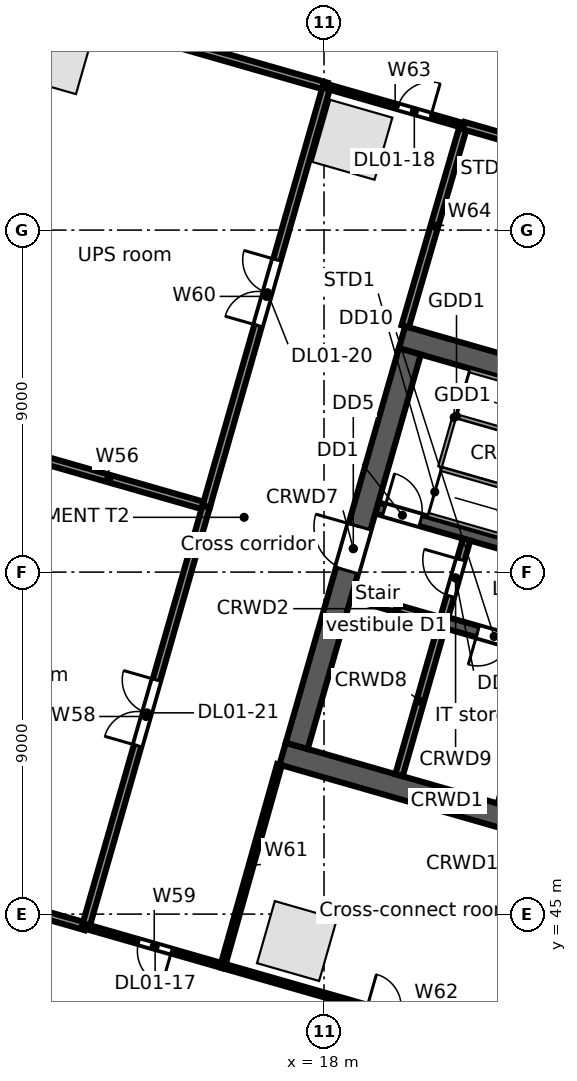
"""IFC4 building model, lengths in metres.
Left out: names, types, materials, properties, quantities, classifications, styles, units other than length and angle.
Written with IfcOpenShell. Run it as: python <this file> out.ifc"""

import sys

from ifc_helpers import new_model, si_unit, direction, frame, frame_2d, origin, origin_2d, place, context, subcontext, project, spatial, rectangle, extrude, element, fill, save


model = new_model("IFC4")
c1 = context("Model", 3, precision=1e-05, world=origin(), true_north=direction((0.0, 1.0)))
c2 = subcontext(c1, "Body", "Model", "MODEL_VIEW")
j1 = project(units=[si_unit("LENGTHUNIT", "METRE"), si_unit("PLANEANGLEUNIT", "RADIAN")], contexts=[c1])
p1 = place(None, origin())
s1 = spatial("IfcSite", under=j1, at=p1, CompositionType="ELEMENT")
p2 = place(p1, origin())
s2 = spatial("IfcBuilding", under=s1, at=p2, CompositionType="ELEMENT")
p3 = place(p2, frame((0.0, 0.0, 6.5)))
s3 = spatial("IfcBuildingStorey", under=s2, at=p3, CompositionType="ELEMENT", Elevation=6.5)
for number, where, z_axis, x_axis in (
    (1, (18.746, 65.376, 0.0), (0.0, 0.0, 1.0), (-0.961, 0.276, 0.0)),
    (2, (10.89, 67.629, 0.0), (0.0, 0.0, 1.0), (-0.961, 0.276, 0.0)),
    (3, (17.288, 44.291, 0.0), (0.0, 0.0, 1.0), (0.961, -0.276, 0.0)),
):
    element("IfcColumn", number, at=place(p3, frame(where, z_axis=z_axis, x_axis=x_axis)), inside=s3, PredefinedType="COLUMN", context=c2, shape_type="SweptSolid", body=[
        extrude(rectangle(XDim=1.7, YDim=1.7, at=origin_2d()), origin(), (0.0, 0.0, 1.0), 5.0),
    ])
p4 = place(p3, frame((16.911, 49.221, 0.0), z_axis=(0.0, 0.0, 1.0), x_axis=(0.96126248289, -0.275634611374, 0.0)))
e4 = element("IfcWall", 4, at=p4, inside=s3, PredefinedType="SOLIDWALL", context=c2, shape_type="SweptSolid", body=[
    extrude(rectangle(XDim=9.0, YDim=0.6, at=frame_2d((4.5, 0.0))), origin(), (0.0, 0.0, 1.0), 4.65),
])
p5 = place(p3, frame((18.728, 53.382, 0.0), z_axis=(0.0, 0.0, 1.0), x_axis=(0.961247070632, -0.275688355216, 0.0)))
e5 = element("IfcWall", 5, at=p5, inside=s3, PredefinedType="SOLIDWALL", context=c2, shape_type="SweptSolid", body=[
    extrude(rectangle(XDim=2.5, YDim=0.2, at=frame_2d((1.25, 0.0))), origin(), (0.0, 0.0, 1.0), 4.65),
])
p6 = place(p3, frame((21.131, 52.692, 0.0), z_axis=(0.0, 0.0, 1.0), x_axis=(0.961271492568, -0.275603188616, 0.0)))
e6 = element("IfcWall", 6, at=p6, inside=s3, PredefinedType="SOLIDWALL", context=c2, shape_type="SweptSolid", body=[
    extrude(rectangle(XDim=5.3, YDim=0.3, at=frame_2d((2.65, 0.0))), origin(), (0.0, 0.0, 1.0), 4.65),
])
p7 = place(p6, frame((0.95, 0.0, 0.0)))
e7 = element("IfcOpeningElement", 7, at=p7, cuts=e6, PredefinedType="OPENING", context=c2, shape_type="SweptSolid", body=[
    extrude(rectangle(XDim=0.9, YDim=2.1, at=frame_2d((0.45, 1.05))), frame((0.0, 0.16, 0.0), z_axis=(0.0, -1.0, 0.0), x_axis=(1.0, 0.0, 0.0)), (0.0, 0.0, 1.0), 0.32),
])
p8 = place(p6, frame((3.75, 0.0, 0.0)))
e8 = element("IfcOpeningElement", 8, at=p8, cuts=e6, PredefinedType="OPENING", context=c2, shape_type="SweptSolid", body=[
    extrude(rectangle(XDim=0.9, YDim=2.1, at=frame_2d((0.45, 1.05))), frame((0.0, 0.16, 0.0), z_axis=(0.0, -1.0, 0.0), x_axis=(1.0, 0.0, 0.0)), (0.0, 0.0, 1.0), 0.32),
])
p9 = place(p3, frame((19.389, 55.689, 0.0), z_axis=(0.0, 0.0, 1.0), x_axis=(0.961261397636, -0.275638396117, 0.0)))
e9 = element("IfcWall", 9, at=p9, inside=s3, PredefinedType="SOLIDWALL", context=c2, shape_type="SweptSolid", body=[
    extrude(rectangle(XDim=7.1, YDim=0.3, at=frame_2d((3.55, 0.0))), origin(), (0.0, 0.0, 1.0), 4.65),
])
p10 = place(p9, frame((0.2, 0.0, 0.0)))
e10 = element("IfcOpeningElement", 10, at=p10, cuts=e9, PredefinedType="OPENING", context=c2, shape_type="SweptSolid", body=[
    extrude(rectangle(XDim=1.0, YDim=2.1, at=frame_2d((0.5, 1.05))), frame((0.0, 0.16, 0.0), z_axis=(0.0, -1.0, 0.0), x_axis=(1.0, 0.0, 0.0)), (0.0, 0.0, 1.0), 0.32),
])
p11 = place(p3, frame((20.053, 60.18, 0.0), z_axis=(0.0, 0.0, 1.0), x_axis=(0.96126248289, -0.275634611374, 0.0)))
e11 = element("IfcWall", 11, at=p11, inside=s3, PredefinedType="SOLIDWALL", context=c2, shape_type="SweptSolid", body=[
    extrude(rectangle(XDim=9.0, YDim=0.6, at=frame_2d((4.5, 0.0))), origin(), (0.0, 0.0, 1.0), 4.65),
])
p12 = place(p3, frame((17.282, 49.427, 0.0), z_axis=(0.0, 0.0, 1.0), x_axis=(0.275631631629, 0.961263337304, 0.0)))
e12 = element("IfcWall", 12, at=p12, inside=s3, PredefinedType="SOLIDWALL", context=c2, shape_type="SweptSolid", body=[
    extrude(rectangle(XDim=10.8, YDim=0.6, at=frame_2d((5.4, 0.0))), origin(), (0.0, 0.0, 1.0), 4.65),
])
p13 = place(p12, frame((4.8, 0.0, 0.0)))
e13 = element("IfcOpeningElement", 13, at=p13, cuts=e12, PredefinedType="OPENING", context=c2, shape_type="SweptSolid", body=[
    extrude(rectangle(XDim=1.2, YDim=2.1, at=frame_2d((0.6, 1.05))), frame((0.0, 0.31, 0.0), z_axis=(0.0, -1.0, 0.0), x_axis=(1.0, 0.0, 0.0)), (0.0, 0.0, 1.0), 0.62),
])
p14 = place(p3, frame((19.973, 48.655, 0.0), z_axis=(0.0, 0.0, 1.0), x_axis=(0.275668441653, 0.961252781674, 0.0)))
e14 = element("IfcWall", 14, at=p14, inside=s3, PredefinedType="SOLIDWALL", context=c2, shape_type="SweptSolid", body=[
    extrude(rectangle(XDim=4.05, YDim=0.2, at=frame_2d((2.025, 0.0))), origin(), (0.0, 0.0, 1.0), 4.65),
])
p15 = place(p3, frame((21.172, 52.837, 0.0), z_axis=(0.0, 0.0, 1.0), x_axis=(0.275657676022, 0.961255868981, 0.0)))
e15 = element("IfcWall", 15, at=p15, inside=s3, PredefinedType="PARTITIONING", context=c2, shape_type="SweptSolid", body=[
    extrude(rectangle(XDim=2.1, YDim=0.2, at=frame_2d((1.05, 0.0))), origin(), (0.0, 0.0, 1.0), 4.65),
])
p16 = place(p15, frame((0.55, 0.0, 0.0)))
e16 = element("IfcOpeningElement", 16, at=p16, cuts=e15, PredefinedType="OPENING", context=c2, shape_type="SweptSolid", body=[
    extrude(rectangle(XDim=1.0, YDim=2.1, at=frame_2d((0.5, 1.05))), frame((0.0, 0.11, 0.0), z_axis=(0.0, -1.0, 0.0), x_axis=(1.0, 0.0, 0.0)), (0.0, 0.0, 1.0), 0.22),
])
p17 = place(p3, frame((4.28, 46.809, 0.0), z_axis=(0.0, 0.0, 1.0), x_axis=(0.961270337968, -0.275607215693, 0.0)))
e17 = element("IfcWall", 17, at=p17, inside=s3, PredefinedType="PARTITIONING", context=c2, shape_type="SweptSolid", body=[
    extrude(rectangle(XDim=7.75, YDim=0.2, at=frame_2d((3.875, 0.0))), origin(), (0.0, 0.0, 1.0), 4.03),
])
p18 = place(p3, frame((9.77, 57.199, 0.0), z_axis=(0.0, 0.0, 1.0), x_axis=(0.961262835898, -0.275633380273, 0.0)))
e18 = element("IfcWall", 18, at=p18, inside=s3, PredefinedType="PARTITIONING", context=c2, shape_type="SweptSolid", body=[
    extrude(rectangle(XDim=5.337, YDim=0.2, at=frame_2d((2.668, 0.0))), origin(), (0.0, 0.0, 1.0), 3.712),
])
p19 = place(p3, frame((10.62, 68.918, 0.0), z_axis=(0.0, 0.0, 1.0), x_axis=(0.961260764876, -0.275640602796, 0.0)))
e19 = element("IfcWall", 19, at=p19, inside=s3, PredefinedType="PARTITIONING", context=c2, shape_type="SweptSolid", body=[
    extrude(rectangle(XDim=7.749, YDim=0.2, at=frame_2d((3.875, 0.0))), origin(), (0.0, 0.0, 1.0), 3.712),
])
p20 = place(p3, frame((11.73, 44.673, 0.0), z_axis=(0.0, 0.0, 1.0), x_axis=(0.275635044812, 0.961262358605, 0.0)))
e20 = element("IfcWall", 20, at=p20, inside=s3, PredefinedType="PARTITIONING", context=c2, shape_type="SweptSolid", body=[
    extrude(rectangle(XDim=11.5, YDim=0.2, at=frame_2d((5.75, 0.0))), origin(), (0.0, 0.0, 1.0), 3.712),
])
p21 = place(p20, frame((4.95, 0.0, 0.0)))
e21 = element("IfcOpeningElement", 21, at=p21, cuts=e20, PredefinedType="OPENING", context=c2, shape_type="SweptSolid", body=[
    extrude(rectangle(XDim=1.8, YDim=2.1, at=frame_2d((0.9, 1.05))), frame((0.0, 0.11, 0.0), z_axis=(0.0, -1.0, 0.0), x_axis=(1.0, 0.0, 0.0)), (0.0, 0.0, 1.0), 0.22),
])
p22 = place(p3, frame((11.73, 44.673, 0.0), z_axis=(0.0, 0.0, 1.0), x_axis=(0.961228613303, -0.275752702557, 0.0)))
e22 = element("IfcWall", 22, at=p22, inside=s3, PredefinedType="PARTITIONING", context=c2, shape_type="SweptSolid", body=[
    extrude(rectangle(XDim=3.75, YDim=0.125, at=frame_2d((1.875, 0.0))), origin(), (0.0, 0.0, 1.0), 4.65),
])
p23 = place(p22, frame((1.45, 0.0, 0.0)))
e23 = element("IfcOpeningElement", 23, at=p23, cuts=e22, PredefinedType="OPENING", context=c2, shape_type="SweptSolid", body=[
    extrude(rectangle(XDim=0.9, YDim=2.1, at=frame_2d((0.45, 1.05))), frame((0.0, 0.073, 0.0), z_axis=(0.0, -1.0, 0.0), x_axis=(1.0, 0.0, 0.0)), (0.0, 0.0, 1.0), 0.145),
])
p24 = place(p3, frame((14.9, 55.728, 0.0), z_axis=(0.0, 0.0, 1.0), x_axis=(0.27559869205, 0.961272781754, 0.0)))
e24 = element("IfcWall", 24, at=p24, inside=s3, PredefinedType="PARTITIONING", context=c2, shape_type="SweptSolid", body=[
    extrude(rectangle(XDim=11.499, YDim=0.2, at=frame_2d((5.75, 0.0))), origin(), (0.0, 0.0, 1.0), 3.712),
])
p25 = place(p24, frame((4.95, 0.0, 0.0)))
e25 = element("IfcOpeningElement", 25, at=p25, cuts=e24, PredefinedType="OPENING", context=c2, shape_type="SweptSolid", body=[
    extrude(rectangle(XDim=1.8, YDim=2.1, at=frame_2d((0.9, 1.05))), frame((0.0, 0.11, 0.0), z_axis=(0.0, -1.0, 0.0), x_axis=(1.0, 0.0, 0.0)), (0.0, 0.0, 1.0), 0.22),
])
p26 = place(p3, frame((15.335, 43.639, 0.0), z_axis=(0.0, 0.0, 1.0), x_axis=(0.271407455373, 0.962464541252, 0.0)))
e26 = element("IfcWall", 26, at=p26, inside=s3, PredefinedType="PARTITIONING", context=c2, shape_type="SweptSolid", body=[
    extrude(rectangle(XDim=5.501, YDim=0.125, at=frame_2d((2.75, 0.0))), origin(), (0.0, 0.0, 1.0), 3.93),
])
p27 = place(p3, frame((15.335, 43.639, 0.0), z_axis=(0.0, 0.0, 1.0), x_axis=(0.961281982754, -0.275566597455, 0.0)))
e27 = element("IfcWall", 27, at=p27, inside=s3, PredefinedType="PARTITIONING", context=c2, shape_type="SweptSolid", body=[
    extrude(rectangle(XDim=9.0, YDim=0.125, at=frame_2d((4.5, 0.0))), origin(), (0.0, 0.0, 1.0), 3.822),
])
p28 = place(p27, frame((3.95, 0.0, 0.0)))
e28 = element("IfcOpeningElement", 28, at=p28, cuts=e27, PredefinedType="OPENING", context=c2, shape_type="SweptSolid", body=[
    extrude(rectangle(XDim=0.9, YDim=2.1, at=frame_2d((0.45, 1.05))), frame((0.0, 0.073, 0.0), z_axis=(0.0, -1.0, 0.0), x_axis=(1.0, 0.0, 0.0)), (0.0, 0.0, 1.0), 0.145),
])
p29 = place(p3, frame((18.069, 66.782, 0.0), z_axis=(0.0, 0.0, 1.0), x_axis=(0.961314848061, -0.275451924837, 0.0)))
e29 = element("IfcWall", 29, at=p29, inside=s3, PredefinedType="PARTITIONING", context=c2, shape_type="SweptSolid", body=[
    extrude(rectangle(XDim=3.75, YDim=0.125, at=frame_2d((1.875, 0.0))), origin(), (0.0, 0.0, 1.0), 3.712),
])
p30 = place(p29, frame((1.95, 0.0, 0.0)))
e30 = element("IfcOpeningElement", 30, at=p30, cuts=e29, PredefinedType="OPENING", context=c2, shape_type="SweptSolid", body=[
    extrude(rectangle(XDim=0.9, YDim=2.1, at=frame_2d((0.45, 1.05))), frame((0.0, 0.073, 0.0), z_axis=(0.0, -1.0, 0.0), x_axis=(1.0, 0.0, 0.0)), (0.0, 0.0, 1.0), 0.145),
])
p31 = place(p3, frame((20.136, 60.468, 0.0), z_axis=(0.0, 0.0, 1.0), x_axis=(0.279630121779, 0.96010780384, 0.0)))
e31 = element("IfcWall", 31, at=p31, inside=s3, PredefinedType="PARTITIONING", context=c2, shape_type="SweptSolid", body=[
    extrude(rectangle(XDim=5.5, YDim=0.2, at=frame_2d((2.75, 0.0))), origin(), (0.0, 0.0, 1.0), 4.018),
])
p32 = place(p3, frame((21.674, 65.749, 0.0), z_axis=(0.0, 0.0, 1.0), x_axis=(0.961259417468, -0.275645301662, 0.0)))
e32 = element("IfcWall", 32, at=p32, inside=s3, PredefinedType="PARTITIONING", context=c2, shape_type="SweptSolid", body=[
    extrude(rectangle(XDim=9.0, YDim=0.2, at=frame_2d((4.5, 0.0))), origin(), (0.0, 0.0, 1.0), 3.822),
])
p33 = place(p10, origin())
e33 = element("IfcDoor", 33, at=p33, inside=s3, OperationType="SINGLE_SWING_LEFT", PredefinedType="DOOR", context=c2, shape_type="SweptSolid", body=[
    extrude(rectangle(XDim=1.0, YDim=2.1, at=frame_2d((0.5, 1.05))), frame((0.0, 0.025, 0.0), z_axis=(0.0, -1.0, 0.0), x_axis=(1.0, 0.0, 0.0)), (0.0, 0.0, 1.0), 0.05),
])
fill(e10, e33)
p34 = place(p16, origin())
e34 = element("IfcDoor", 34, at=p34, inside=s3, OperationType="SINGLE_SWING_RIGHT", PredefinedType="DOOR", context=c2, shape_type="SweptSolid", body=[
    extrude(rectangle(XDim=1.0, YDim=2.1, at=frame_2d((0.5, 1.05))), frame((0.0, 0.025, 0.0), z_axis=(0.0, -1.0, 0.0), x_axis=(1.0, 0.0, 0.0)), (0.0, 0.0, 1.0), 0.05),
])
fill(e16, e34)
p35 = place(p13, origin())
e35 = element("IfcDoor", 35, at=p35, inside=s3, OperationType="SINGLE_SWING_RIGHT", PredefinedType="DOOR", context=c2, shape_type="SweptSolid", body=[
    extrude(rectangle(XDim=1.2, YDim=2.1, at=frame_2d((0.6, 1.05))), frame((0.0, 0.025, 0.0), z_axis=(0.0, -1.0, 0.0), x_axis=(1.0, 0.0, 0.0)), (0.0, 0.0, 1.0), 0.05),
])
fill(e13, e35)
p36 = place(p7, frame((0.9, 0.0, 0.0), z_axis=(0.0, 0.0, 1.0), x_axis=(-1.0, 0.0, 0.0)))
e36 = element("IfcDoor", 36, at=p36, inside=s3, OperationType="SINGLE_SWING_RIGHT", PredefinedType="DOOR", context=c2, shape_type="SweptSolid", body=[
    extrude(rectangle(XDim=0.9, YDim=2.1, at=frame_2d((0.45, 1.05))), frame((0.0, 0.025, 0.0), z_axis=(0.0, -1.0, 0.0), x_axis=(1.0, 0.0, 0.0)), (0.0, 0.0, 1.0), 0.05),
])
fill(e7, e36)
p37 = place(p23, frame((0.9, 0.0, 0.0), z_axis=(0.0, 0.0, 1.0), x_axis=(-1.0, 0.0, 0.0)))
e37 = element("IfcDoor", 37, at=p37, inside=s3, OperationType="SINGLE_SWING_LEFT", PredefinedType="DOOR", context=c2, shape_type="SweptSolid", body=[
    extrude(rectangle(XDim=0.9, YDim=2.1, at=frame_2d((0.45, 1.05))), frame((0.0, 0.025, 0.0), z_axis=(0.0, -1.0, 0.0), x_axis=(1.0, 0.0, 0.0)), (0.0, 0.0, 1.0), 0.05),
])
fill(e23, e37)
p38 = place(p30, origin())
e38 = element("IfcDoor", 38, at=p38, inside=s3, OperationType="SINGLE_SWING_RIGHT", PredefinedType="DOOR", context=c2, shape_type="SweptSolid", body=[
    extrude(rectangle(XDim=0.9, YDim=2.1, at=frame_2d((0.45, 1.05))), frame((0.0, 0.025, 0.0), z_axis=(0.0, -1.0, 0.0), x_axis=(1.0, 0.0, 0.0)), (0.0, 0.0, 1.0), 0.05),
])
fill(e30, e38)
p39 = place(p25, origin())
e39 = element("IfcDoor", 39, at=p39, inside=s3, OperationType="DOUBLE_DOOR_SINGLE_SWING", PredefinedType="DOOR", context=c2, shape_type="SweptSolid", body=[
    extrude(rectangle(XDim=1.8, YDim=2.1, at=frame_2d((0.9, 1.05))), frame((0.0, 0.025, 0.0), z_axis=(0.0, -1.0, 0.0), x_axis=(1.0, 0.0, 0.0)), (0.0, 0.0, 1.0), 0.05),
])
fill(e25, e39)
p40 = place(p21, origin())
e40 = element("IfcDoor", 40, at=p40, inside=s3, OperationType="DOUBLE_DOOR_SINGLE_SWING", PredefinedType="DOOR", context=c2, shape_type="SweptSolid", body=[
    extrude(rectangle(XDim=1.8, YDim=2.1, at=frame_2d((0.9, 1.05))), frame((0.0, 0.025, 0.0), z_axis=(0.0, -1.0, 0.0), x_axis=(1.0, 0.0, 0.0)), (0.0, 0.0, 1.0), 0.05),
])
fill(e21, e40)
save(model, sys.argv[1])
